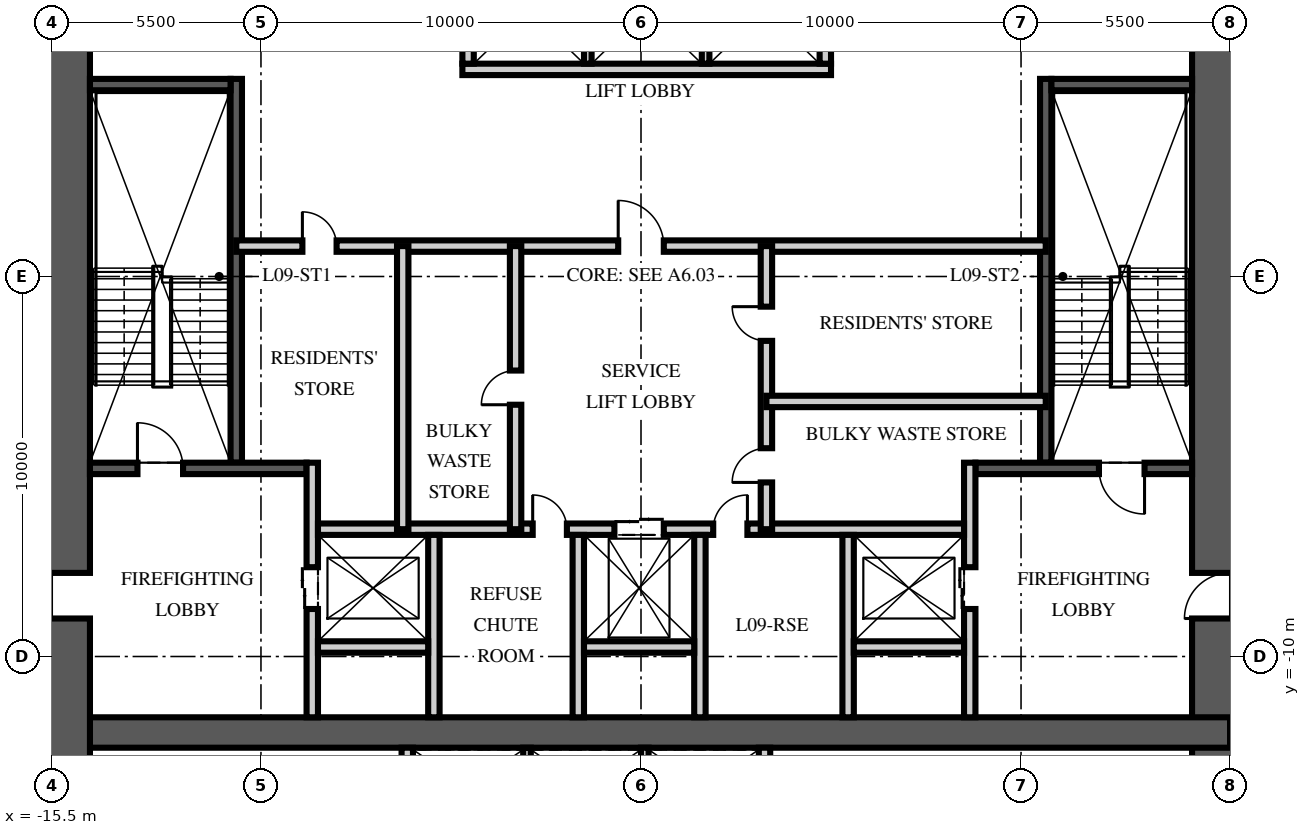
"""IFC4 building model, lengths in metres.
Left out: names, types, materials, properties, quantities, classifications, styles, units other than length and angle.
Written with IfcOpenShell. Run it as: python <this file> out.ifc"""

import sys

from ifc_helpers import new_model, si_unit, direction, frame, frame_2d, origin, place, context, subcontext, project, spatial, rectangle, extrude, element, fill, save


model = new_model("IFC4")
c1 = context("Model", 3, precision=1e-05, world=origin(), true_north=direction((0.0, 1.0)))
c2 = subcontext(c1, "Body", "Model", "MODEL_VIEW")
j1 = project(units=[si_unit("LENGTHUNIT", "METRE"), si_unit("PLANEANGLEUNIT", "RADIAN")], contexts=[c1])
p1 = place(None, origin())
s1 = spatial("IfcSite", under=j1, at=p1, CompositionType="ELEMENT")
p2 = place(p1, origin())
s2 = spatial("IfcBuilding", under=s1, at=p2, CompositionType="ELEMENT")
p3 = place(p2, frame((0.0, 0.0, 39.75)))
s3 = spatial("IfcBuildingStorey", under=s2, at=p3, CompositionType="ELEMENT", Elevation=39.75)
p4 = place(p3, frame((15.5, -15.5, -0.25), z_axis=(0.0, 0.0, 1.0), x_axis=(0.0, 1.0, 0.0)))
e1 = element("IfcWall", 1, at=p4, inside=s3, PredefinedType="SHEAR", context=c2, shape_type="SweptSolid", body=[
    extrude(rectangle(XDim=31.0, YDim=2.0, at=frame_2d((15.5, 0.0))), origin(), (0.0, 0.0, 1.0), 3.75),
])
p5 = place(p4, frame((6.5, 0.0, 0.25)))
e2 = element("IfcOpeningElement", 2, at=p5, cuts=e1, PredefinedType="OPENING", context=c2, shape_type="SweptSolid", body=[
    extrude(rectangle(XDim=1.2, YDim=2.1, at=frame_2d((0.6, 1.05))), frame((0.0, 1.01, 0.0), z_axis=(0.0, -1.0, 0.0), x_axis=(1.0, 0.0, 0.0)), (0.0, 0.0, 1.0), 2.02),
])
p6 = place(p4, frame((23.0, 0.0, 0.25)))
e3 = element("IfcOpeningElement", 3, at=p6, cuts=e1, PredefinedType="OPENING", context=c2, shape_type="SweptSolid", body=[
    extrude(rectangle(XDim=1.8, YDim=2.1, at=frame_2d((0.9, 1.05))), frame((0.0, 1.01, 0.0), z_axis=(0.0, -1.0, 0.0), x_axis=(1.0, 0.0, 0.0)), (0.0, 0.0, 1.0), 2.02),
])
p7 = place(p3, frame((-15.5, -12.0, -0.25), z_axis=(0.0, 0.0, 1.0), x_axis=(1.0, 0.0, 0.0)))
e4 = element("IfcWall", 4, at=p7, inside=s3, PredefinedType="SHEAR", context=c2, shape_type="SweptSolid", body=[
    extrude(rectangle(XDim=31.0, YDim=0.8, at=frame_2d((15.5, 0.0))), origin(), (0.0, 0.0, 1.0), 3.75),
])
p8 = place(p3, frame((-15.5, -15.5, -0.25), z_axis=(0.0, 0.0, 1.0), x_axis=(0.0, 1.0, 0.0)))
e5 = element("IfcWall", 5, at=p8, inside=s3, PredefinedType="SHEAR", context=c2, shape_type="SweptSolid", body=[
    extrude(rectangle(XDim=31.0, YDim=2.0, at=frame_2d((15.5, 0.0))), origin(), (0.0, 0.0, 1.0), 3.75),
])
p9 = place(p8, frame((6.5, 0.0, 0.25)))
e6 = element("IfcOpeningElement", 6, at=p9, cuts=e5, PredefinedType="OPENING", context=c2, shape_type="SweptSolid", body=[
    extrude(rectangle(XDim=1.2, YDim=2.1, at=frame_2d((0.6, 1.05))), frame((0.0, 1.01, 0.0), z_axis=(0.0, -1.0, 0.0), x_axis=(1.0, 0.0, 0.0)), (0.0, 0.0, 1.0), 2.02),
])
p10 = place(p8, frame((23.0, 0.0, 0.25)))
e7 = element("IfcOpeningElement", 7, at=p10, cuts=e5, PredefinedType="OPENING", context=c2, shape_type="SweptSolid", body=[
    extrude(rectangle(XDim=1.8, YDim=2.1, at=frame_2d((0.9, 1.05))), frame((0.0, 1.01, 0.0), z_axis=(0.0, -1.0, 0.0), x_axis=(1.0, 0.0, 0.0)), (0.0, 0.0, 1.0), 2.02),
])
p11 = place(p3, frame((-10.65, -4.9, 0.0), z_axis=(0.0, 0.0, 1.0), x_axis=(0.0, 1.0, 0.0)))
e8 = element("IfcWall", 8, at=p11, inside=s3, PredefinedType="SOLIDWALL", context=c2, shape_type="SweptSolid", body=[
    extrude(rectangle(XDim=10.1, YDim=0.3, at=frame_2d((5.05, 0.0))), origin(), (0.0, 0.0, 1.0), 3.5),
])
p12 = place(p3, frame((-14.5, -5.05, 0.0), z_axis=(0.0, 0.0, 1.0), x_axis=(1.0, 0.0, 0.0)))
e9 = element("IfcWall", 9, at=p12, inside=s3, PredefinedType="SOLIDWALL", context=c2, shape_type="SweptSolid", body=[
    extrude(rectangle(XDim=5.7, YDim=0.3, at=frame_2d((2.85, 0.0))), origin(), (0.0, 0.0, 1.0), 3.5),
])
p13 = place(p12, frame((1.25, 0.0, 0.0)))
e10 = element("IfcOpeningElement", 10, at=p13, cuts=e9, PredefinedType="OPENING", context=c2, shape_type="SweptSolid", body=[
    extrude(rectangle(XDim=1.2, YDim=2.1, at=frame_2d((0.6, 1.05))), frame((0.0, 0.16, 0.0), z_axis=(0.0, -1.0, 0.0), x_axis=(1.0, 0.0, 0.0)), (0.0, 0.0, 1.0), 0.32),
])
p14 = place(p3, frame((-14.5, 5.05, 0.0), z_axis=(0.0, 0.0, 1.0), x_axis=(1.0, 0.0, 0.0)))
e11 = element("IfcWall", 11, at=p14, inside=s3, PredefinedType="SOLIDWALL", context=c2, shape_type="SweptSolid", body=[
    extrude(rectangle(XDim=3.7, YDim=0.3, at=frame_2d((1.85, 0.0))), origin(), (0.0, 0.0, 1.0), 3.5),
])
p15 = place(p3, frame((-8.65, -11.6, 0.0), z_axis=(0.0, 0.0, 1.0), x_axis=(0.0, 1.0, 0.0)))
e12 = element("IfcWall", 12, at=p15, inside=s3, PredefinedType="PARTITIONING", context=c2, shape_type="SweptSolid", body=[
    extrude(rectangle(XDim=6.7, YDim=0.3, at=frame_2d((3.35, 0.0))), origin(), (0.0, 0.0, 1.0), 3.5),
])
p16 = place(p15, frame((2.85, 0.0, 0.0)))
e13 = element("IfcOpeningElement", 13, at=p16, cuts=e12, PredefinedType="OPENING", context=c2, shape_type="SweptSolid", body=[
    extrude(rectangle(XDim=1.1, YDim=2.1, at=frame_2d((0.55, 1.05))), frame((0.0, 0.16, 0.0), z_axis=(0.0, -1.0, 0.0), x_axis=(1.0, 0.0, 0.0)), (0.0, 0.0, 1.0), 0.32),
])
p17 = place(p3, frame((10.65, -4.9, 0.0), z_axis=(0.0, 0.0, 1.0), x_axis=(0.0, 1.0, 0.0)))
e14 = element("IfcWall", 14, at=p17, inside=s3, PredefinedType="SOLIDWALL", context=c2, shape_type="SweptSolid", body=[
    extrude(rectangle(XDim=10.1, YDim=0.3, at=frame_2d((5.05, 0.0))), origin(), (0.0, 0.0, 1.0), 3.5),
])
p18 = place(p3, frame((14.5, -5.05, 0.0), z_axis=(0.0, 0.0, 1.0), x_axis=(-1.0, 0.0, 0.0)))
e15 = element("IfcWall", 15, at=p18, inside=s3, PredefinedType="SOLIDWALL", context=c2, shape_type="SweptSolid", body=[
    extrude(rectangle(XDim=5.7, YDim=0.3, at=frame_2d((2.85, 0.0))), origin(), (0.0, 0.0, 1.0), 3.5),
])
p19 = place(p18, frame((1.25, 0.0, 0.0)))
e16 = element("IfcOpeningElement", 16, at=p19, cuts=e15, PredefinedType="OPENING", context=c2, shape_type="SweptSolid", body=[
    extrude(rectangle(XDim=1.2, YDim=2.1, at=frame_2d((0.6, 1.05))), frame((0.0, 0.16, 0.0), z_axis=(0.0, -1.0, 0.0), x_axis=(1.0, 0.0, 0.0)), (0.0, 0.0, 1.0), 0.32),
])
p20 = place(p3, frame((14.5, 5.05, 0.0), z_axis=(0.0, 0.0, 1.0), x_axis=(-1.0, 0.0, 0.0)))
e17 = element("IfcWall", 17, at=p20, inside=s3, PredefinedType="SOLIDWALL", context=c2, shape_type="SweptSolid", body=[
    extrude(rectangle(XDim=3.7, YDim=0.3, at=frame_2d((1.85, 0.0))), origin(), (0.0, 0.0, 1.0), 3.5),
])
p21 = place(p3, frame((8.65, -11.6, 0.0), z_axis=(0.0, 0.0, 1.0), x_axis=(0.0, 1.0, 0.0)))
e18 = element("IfcWall", 18, at=p21, inside=s3, PredefinedType="PARTITIONING", context=c2, shape_type="SweptSolid", body=[
    extrude(rectangle(XDim=6.7, YDim=0.3, at=frame_2d((3.35, 0.0))), origin(), (0.0, 0.0, 1.0), 3.5),
])
p22 = place(p21, frame((2.85, 0.0, 0.0)))
e19 = element("IfcOpeningElement", 19, at=p22, cuts=e18, PredefinedType="OPENING", context=c2, shape_type="SweptSolid", body=[
    extrude(rectangle(XDim=1.1, YDim=2.1, at=frame_2d((0.55, 1.05))), frame((0.0, 0.16, 0.0), z_axis=(0.0, -1.0, 0.0), x_axis=(1.0, 0.0, 0.0)), (0.0, 0.0, 1.0), 0.32),
])
p23 = place(p3, frame((-8.5, -6.65, 0.0), z_axis=(0.0, 0.0, 1.0), x_axis=(1.0, 0.0, 0.0)))
e20 = element("IfcWall", 20, at=p23, inside=s3, PredefinedType="PARTITIONING", context=c2, shape_type="SweptSolid", body=[
    extrude(rectangle(XDim=17.0, YDim=0.3, at=frame_2d((8.5, 0.0))), origin(), (0.0, 0.0, 1.0), 3.5),
])
p24 = place(p23, frame((7.8, 0.0, 0.0)))
e21 = element("IfcOpeningElement", 21, at=p24, cuts=e20, PredefinedType="OPENING", context=c2, shape_type="SweptSolid", body=[
    extrude(rectangle(XDim=1.3, YDim=2.4, at=frame_2d((0.65, 1.2))), frame((0.0, 0.16, 0.0), z_axis=(0.0, -1.0, 0.0), x_axis=(1.0, 0.0, 0.0)), (0.0, 0.0, 1.0), 0.32),
])
p25 = place(p23, frame((5.65, 0.0, 0.0)))
e22 = element("IfcOpeningElement", 22, at=p25, cuts=e20, PredefinedType="OPENING", context=c2, shape_type="SweptSolid", body=[
    extrude(rectangle(XDim=0.9, YDim=2.1, at=frame_2d((0.45, 1.05))), frame((0.0, 0.16, 0.0), z_axis=(0.0, -1.0, 0.0), x_axis=(1.0, 0.0, 0.0)), (0.0, 0.0, 1.0), 0.32),
])
p26 = place(p23, frame((10.4, 0.0, 0.0)))
e23 = element("IfcOpeningElement", 23, at=p26, cuts=e20, PredefinedType="OPENING", context=c2, shape_type="SweptSolid", body=[
    extrude(rectangle(XDim=0.9, YDim=2.1, at=frame_2d((0.45, 1.05))), frame((0.0, 0.16, 0.0), z_axis=(0.0, -1.0, 0.0), x_axis=(1.0, 0.0, 0.0)), (0.0, 0.0, 1.0), 0.32),
])
for number, where, z_axis, x_axis in (
    (24, (-5.45, -11.6, 0.0), (0.0, 0.0, 1.0), (0.0, 1.0, 0.0)),
    (25, (-1.65, -11.6, 0.0), (0.0, 0.0, 1.0), (0.0, 1.0, 0.0)),
    (26, (1.55, -11.6, 0.0), (0.0, 0.0, 1.0), (0.0, 1.0, 0.0)),
    (27, (5.45, -11.6, 0.0), (0.0, 0.0, 1.0), (0.0, 1.0, 0.0)),
):
    element("IfcWall", number, at=place(p3, frame(where, z_axis=z_axis, x_axis=x_axis)), inside=s3, PredefinedType="PARTITIONING", context=c2, shape_type="SweptSolid", body=[
        extrude(rectangle(XDim=4.8, YDim=0.3, at=frame_2d((2.4, 0.0))), origin(), (0.0, 0.0, 1.0), 3.5),
    ])
for number, where, z_axis, x_axis in (
    (28, (-8.5, -9.75, 0.0), (0.0, 0.0, 1.0), (1.0, 0.0, 0.0)),
    (29, (-1.5, -9.75, 0.0), (0.0, 0.0, 1.0), (1.0, 0.0, 0.0)),
    (30, (5.6, -9.75, 0.0), (0.0, 0.0, 1.0), (1.0, 0.0, 0.0)),
):
    element("IfcWall", number, at=place(p3, frame(where, z_axis=z_axis, x_axis=x_axis)), inside=s3, PredefinedType="PARTITIONING", context=c2, shape_type="SweptSolid", body=[
        extrude(rectangle(XDim=2.9, YDim=0.3, at=frame_2d((1.45, 0.0))), origin(), (0.0, 0.0, 1.0), 3.5),
    ])
p27 = place(p3, frame((-4.7, 5.45, 0.0), z_axis=(0.0, 0.0, 1.0), x_axis=(1.0, 0.0, 0.0)))
e31 = element("IfcWall", 31, at=p27, inside=s3, PredefinedType="PARTITIONING", context=c2, shape_type="SweptSolid", body=[
    extrude(rectangle(XDim=9.7, YDim=0.3, at=frame_2d((4.85, 0.0))), origin(), (0.0, 0.0, 1.0), 3.5),
])
for number, where, z_axis, x_axis in (
    (32, (-4.55, 5.6, 0.0), (0.0, 0.0, 1.0), (0.0, 1.0, 0.0)),
    (33, (4.85, 5.6, 0.0), (0.0, 0.0, 1.0), (0.0, 1.0, 0.0)),
):
    element("IfcWall", number, at=place(p3, frame(where, z_axis=z_axis, x_axis=x_axis)), inside=s3, PredefinedType="PARTITIONING", context=c2, shape_type="SweptSolid", body=[
        extrude(rectangle(XDim=2.8, YDim=0.3, at=frame_2d((1.4, 0.0))), origin(), (0.0, 0.0, 1.0), 3.5),
    ])
for number, where, z_axis, x_axis in (
    (34, (-1.4, 5.6, 0.0), (0.0, 0.0, 1.0), (0.0, 1.0, 0.0)),
    (35, (1.7, 5.6, 0.0), (0.0, 0.0, 1.0), (0.0, 1.0, 0.0)),
):
    element("IfcWall", number, at=place(p3, frame(where, z_axis=z_axis, x_axis=x_axis)), inside=s3, PredefinedType="PARTITIONING", context=c2, shape_type="SweptSolid", body=[
        extrude(rectangle(XDim=2.8, YDim=0.2, at=frame_2d((1.4, 0.0))), origin(), (0.0, 0.0, 1.0), 3.5),
    ])
for number, where, z_axis, x_axis in (
    (36, (-6.15, -14.5, 0.0), (0.0, 0.0, 1.0), (0.0, 1.0, 0.0)),
    (37, (3.25, -14.5, 0.0), (0.0, 0.0, 1.0), (0.0, 1.0, 0.0)),
):
    element("IfcWall", number, at=place(p3, frame(where, z_axis=z_axis, x_axis=x_axis)), inside=s3, PredefinedType="PARTITIONING", context=c2, shape_type="SweptSolid", body=[
        extrude(rectangle(XDim=2.1, YDim=0.3, at=frame_2d((1.05, 0.0))), origin(), (0.0, 0.0, 1.0), 3.5),
    ])
for number, where, z_axis, x_axis in (
    (38, (-3.0, -14.5, 0.0), (0.0, 0.0, 1.0), (0.0, 1.0, 0.0)),
    (39, (0.1, -14.5, 0.0), (0.0, 0.0, 1.0), (0.0, 1.0, 0.0)),
):
    element("IfcWall", number, at=place(p3, frame(where, z_axis=z_axis, x_axis=x_axis)), inside=s3, PredefinedType="PARTITIONING", context=c2, shape_type="SweptSolid", body=[
        extrude(rectangle(XDim=2.1, YDim=0.2, at=frame_2d((1.05, 0.0))), origin(), (0.0, 0.0, 1.0), 3.5),
    ])
p28 = place(p3, frame((-10.65, 0.8, 0.0), z_axis=(0.0, 0.0, 1.0), x_axis=(1.0, 0.0, 0.0)))
e40 = element("IfcWall", 40, at=p28, inside=s3, PredefinedType="PARTITIONING", context=c2, shape_type="SweptSolid", body=[
    extrude(rectangle(XDim=21.3, YDim=0.3, at=frame_2d((10.65, 0.0))), origin(), (0.0, 0.0, 1.0), 3.5),
])
p29 = place(p28, frame((10.05, 0.0, 0.0)))
e41 = element("IfcOpeningElement", 41, at=p29, cuts=e40, PredefinedType="OPENING", context=c2, shape_type="SweptSolid", body=[
    extrude(rectangle(XDim=1.2, YDim=2.1, at=frame_2d((0.6, 1.05))), frame((0.0, 0.16, 0.0), z_axis=(0.0, -1.0, 0.0), x_axis=(1.0, 0.0, 0.0)), (0.0, 0.0, 1.0), 0.32),
])
p30 = place(p28, frame((1.74, 0.0, 0.0)))
e42 = element("IfcOpeningElement", 42, at=p30, cuts=e40, PredefinedType="OPENING", context=c2, shape_type="SweptSolid", body=[
    extrude(rectangle(XDim=0.9, YDim=2.1, at=frame_2d((0.45, 1.05))), frame((0.0, 0.16, 0.0), z_axis=(0.0, -1.0, 0.0), x_axis=(1.0, 0.0, 0.0)), (0.0, 0.0, 1.0), 0.32),
])
p31 = place(p3, frame((-3.3, -6.65, 0.0), z_axis=(0.0, 0.0, 1.0), x_axis=(0.0, 1.0, 0.0)))
e43 = element("IfcWall", 43, at=p31, inside=s3, PredefinedType="PARTITIONING", context=c2, shape_type="SweptSolid", body=[
    extrude(rectangle(XDim=7.45, YDim=0.3, at=frame_2d((3.725, 0.0))), origin(), (0.0, 0.0, 1.0), 3.5),
])
p32 = place(p31, frame((3.275, 0.0, 0.0)))
e44 = element("IfcOpeningElement", 44, at=p32, cuts=e43, PredefinedType="OPENING", context=c2, shape_type="SweptSolid", body=[
    extrude(rectangle(XDim=0.9, YDim=2.1, at=frame_2d((0.45, 1.05))), frame((0.0, 0.16, 0.0), z_axis=(0.0, -1.0, 0.0), x_axis=(1.0, 0.0, 0.0)), (0.0, 0.0, 1.0), 0.32),
])
p33 = place(p3, frame((3.3, -6.65, 0.0), z_axis=(0.0, 0.0, 1.0), x_axis=(0.0, 1.0, 0.0)))
e45 = element("IfcWall", 45, at=p33, inside=s3, PredefinedType="PARTITIONING", context=c2, shape_type="SweptSolid", body=[
    extrude(rectangle(XDim=7.45, YDim=0.3, at=frame_2d((3.725, 0.0))), origin(), (0.0, 0.0, 1.0), 3.5),
])
p34 = place(p33, frame((1.231, 0.0, 0.0)))
e46 = element("IfcOpeningElement", 46, at=p34, cuts=e45, PredefinedType="OPENING", context=c2, shape_type="SweptSolid", body=[
    extrude(rectangle(XDim=0.9, YDim=2.1, at=frame_2d((0.45, 1.05))), frame((0.0, 0.16, 0.0), z_axis=(0.0, -1.0, 0.0), x_axis=(1.0, 0.0, 0.0)), (0.0, 0.0, 1.0), 0.32),
])
p35 = place(p33, frame((4.956, 0.0, 0.0)))
e47 = element("IfcOpeningElement", 47, at=p35, cuts=e45, PredefinedType="OPENING", context=c2, shape_type="SweptSolid", body=[
    extrude(rectangle(XDim=0.9, YDim=2.1, at=frame_2d((0.45, 1.05))), frame((0.0, 0.16, 0.0), z_axis=(0.0, -1.0, 0.0), x_axis=(1.0, 0.0, 0.0)), (0.0, 0.0, 1.0), 0.32),
])
p36 = place(p3, frame((-6.27, -6.65, 0.0), z_axis=(0.0, 0.0, 1.0), x_axis=(0.0, 1.0, 0.0)))
e48 = element("IfcWall", 48, at=p36, inside=s3, PredefinedType="PARTITIONING", context=c2, shape_type="SweptSolid", body=[
    extrude(rectangle(XDim=7.45, YDim=0.3, at=frame_2d((3.725, 0.0))), origin(), (0.0, 0.0, 1.0), 3.5),
])
p37 = place(p3, frame((10.65, -3.288, 0.0), z_axis=(0.0, 0.0, 1.0), x_axis=(-1.0, 0.0, 0.0)))
e49 = element("IfcWall", 49, at=p37, inside=s3, PredefinedType="PARTITIONING", context=c2, shape_type="SweptSolid", body=[
    extrude(rectangle(XDim=7.35, YDim=0.3, at=frame_2d((3.675, 0.0))), origin(), (0.0, 0.0, 1.0), 3.5),
])
p38 = place(p13, origin())
e50 = element("IfcDoor", 50, at=p38, inside=s3, OperationType="SINGLE_SWING_LEFT", PredefinedType="DOOR", context=c2, shape_type="SweptSolid", body=[
    extrude(rectangle(XDim=1.2, YDim=2.1, at=frame_2d((0.6, 1.05))), frame((0.0, 0.025, 0.0), z_axis=(0.0, -1.0, 0.0), x_axis=(1.0, 0.0, 0.0)), (0.0, 0.0, 1.0), 0.05),
])
fill(e10, e50)
p39 = place(p9, origin())
e51 = element("IfcDoor", 51, at=p39, inside=s3, OperationType="SINGLE_SWING_LEFT", PredefinedType="DOOR", context=c2, shape_type="SweptSolid", body=[
    extrude(rectangle(XDim=1.2, YDim=2.1, at=frame_2d((0.6, 1.05))), frame((0.0, 0.025, 0.0), z_axis=(0.0, -1.0, 0.0), x_axis=(1.0, 0.0, 0.0)), (0.0, 0.0, 1.0), 0.05),
])
fill(e6, e51)
p40 = place(p19, origin())
e52 = element("IfcDoor", 52, at=p40, inside=s3, OperationType="SINGLE_SWING_LEFT", PredefinedType="DOOR", context=c2, shape_type="SweptSolid", body=[
    extrude(rectangle(XDim=1.2, YDim=2.1, at=frame_2d((0.6, 1.05))), frame((0.0, 0.025, 0.0), z_axis=(0.0, -1.0, 0.0), x_axis=(1.0, 0.0, 0.0)), (0.0, 0.0, 1.0), 0.05),
])
fill(e16, e52)
p41 = place(p5, origin())
e53 = element("IfcDoor", 53, at=p41, inside=s3, OperationType="SINGLE_SWING_LEFT", PredefinedType="DOOR", context=c2, shape_type="SweptSolid", body=[
    extrude(rectangle(XDim=1.2, YDim=2.1, at=frame_2d((0.6, 1.05))), frame((0.0, 0.025, 0.0), z_axis=(0.0, -1.0, 0.0), x_axis=(1.0, 0.0, 0.0)), (0.0, 0.0, 1.0), 0.05),
])
fill(e2, e53)
p42 = place(p16, origin())
e54 = element("IfcDoor", 54, at=p42, inside=s3, OperationType="DOUBLE_DOOR_SLIDING", PredefinedType="DOOR", context=c2, shape_type="SweptSolid", body=[
    extrude(rectangle(XDim=1.1, YDim=2.1, at=frame_2d((0.55, 1.05))), frame((0.0, 0.025, 0.0), z_axis=(0.0, -1.0, 0.0), x_axis=(1.0, 0.0, 0.0)), (0.0, 0.0, 1.0), 0.05),
])
fill(e13, e54)
p43 = place(p22, origin())
e55 = element("IfcDoor", 55, at=p43, inside=s3, OperationType="DOUBLE_DOOR_SLIDING", PredefinedType="DOOR", context=c2, shape_type="SweptSolid", body=[
    extrude(rectangle(XDim=1.1, YDim=2.1, at=frame_2d((0.55, 1.05))), frame((0.0, 0.025, 0.0), z_axis=(0.0, -1.0, 0.0), x_axis=(1.0, 0.0, 0.0)), (0.0, 0.0, 1.0), 0.05),
])
fill(e19, e55)
p44 = place(p24, origin())
e56 = element("IfcDoor", 56, at=p44, inside=s3, OperationType="DOUBLE_DOOR_SLIDING", PredefinedType="DOOR", context=c2, shape_type="SweptSolid", body=[
    extrude(rectangle(XDim=1.3, YDim=2.4, at=frame_2d((0.65, 1.2))), frame((0.0, 0.025, 0.0), z_axis=(0.0, -1.0, 0.0), x_axis=(1.0, 0.0, 0.0)), (0.0, 0.0, 1.0), 0.05),
])
fill(e21, e56)
p45 = place(p29, origin())
e57 = element("IfcDoor", 57, at=p45, inside=s3, OperationType="SINGLE_SWING_LEFT", PredefinedType="DOOR", context=c2, shape_type="SweptSolid", body=[
    extrude(rectangle(XDim=1.2, YDim=2.1, at=frame_2d((0.6, 1.05))), frame((0.0, 0.025, 0.0), z_axis=(0.0, -1.0, 0.0), x_axis=(1.0, 0.0, 0.0)), (0.0, 0.0, 1.0), 0.05),
])
fill(e41, e57)
p46 = place(p25, origin())
e58 = element("IfcDoor", 58, at=p46, inside=s3, OperationType="SINGLE_SWING_LEFT", PredefinedType="DOOR", context=c2, shape_type="SweptSolid", body=[
    extrude(rectangle(XDim=0.9, YDim=2.1, at=frame_2d((0.45, 1.05))), frame((0.0, 0.025, 0.0), z_axis=(0.0, -1.0, 0.0), x_axis=(1.0, 0.0, 0.0)), (0.0, 0.0, 1.0), 0.05),
])
fill(e22, e58)
p47 = place(p26, origin())
e59 = element("IfcDoor", 59, at=p47, inside=s3, OperationType="SINGLE_SWING_RIGHT", PredefinedType="DOOR", context=c2, shape_type="SweptSolid", body=[
    extrude(rectangle(XDim=0.9, YDim=2.1, at=frame_2d((0.45, 1.05))), frame((0.0, 0.025, 0.0), z_axis=(0.0, -1.0, 0.0), x_axis=(1.0, 0.0, 0.0)), (0.0, 0.0, 1.0), 0.05),
])
fill(e23, e59)
p48 = place(p32, origin())
e60 = element("IfcDoor", 60, at=p48, inside=s3, OperationType="SINGLE_SWING_LEFT", PredefinedType="DOOR", context=c2, shape_type="SweptSolid", body=[
    extrude(rectangle(XDim=0.9, YDim=2.1, at=frame_2d((0.45, 1.05))), frame((0.0, 0.025, 0.0), z_axis=(0.0, -1.0, 0.0), x_axis=(1.0, 0.0, 0.0)), (0.0, 0.0, 1.0), 0.05),
])
fill(e44, e60)
p49 = place(p30, origin())
e61 = element("IfcDoor", 61, at=p49, inside=s3, OperationType="SINGLE_SWING_LEFT", PredefinedType="DOOR", context=c2, shape_type="SweptSolid", body=[
    extrude(rectangle(XDim=0.9, YDim=2.1, at=frame_2d((0.45, 1.05))), frame((0.0, 0.025, 0.0), z_axis=(0.0, -1.0, 0.0), x_axis=(1.0, 0.0, 0.0)), (0.0, 0.0, 1.0), 0.05),
])
fill(e42, e61)
p50 = place(p34, origin())
e62 = element("IfcDoor", 62, at=p50, inside=s3, OperationType="SINGLE_SWING_LEFT", PredefinedType="DOOR", context=c2, shape_type="SweptSolid", body=[
    extrude(rectangle(XDim=0.9, YDim=2.1, at=frame_2d((0.45, 1.05))), frame((0.0, 0.025, 0.0), z_axis=(0.0, -1.0, 0.0), x_axis=(1.0, 0.0, 0.0)), (0.0, 0.0, 1.0), 0.05),
])
fill(e46, e62)
p51 = place(p35, origin())
e63 = element("IfcDoor", 63, at=p51, inside=s3, OperationType="SINGLE_SWING_RIGHT", PredefinedType="DOOR", context=c2, shape_type="SweptSolid", body=[
    extrude(rectangle(XDim=0.9, YDim=2.1, at=frame_2d((0.45, 1.05))), frame((0.0, 0.025, 0.0), z_axis=(0.0, -1.0, 0.0), x_axis=(1.0, 0.0, 0.0)), (0.0, 0.0, 1.0), 0.05),
])
fill(e47, e63)
save(model, sys.argv[1])
